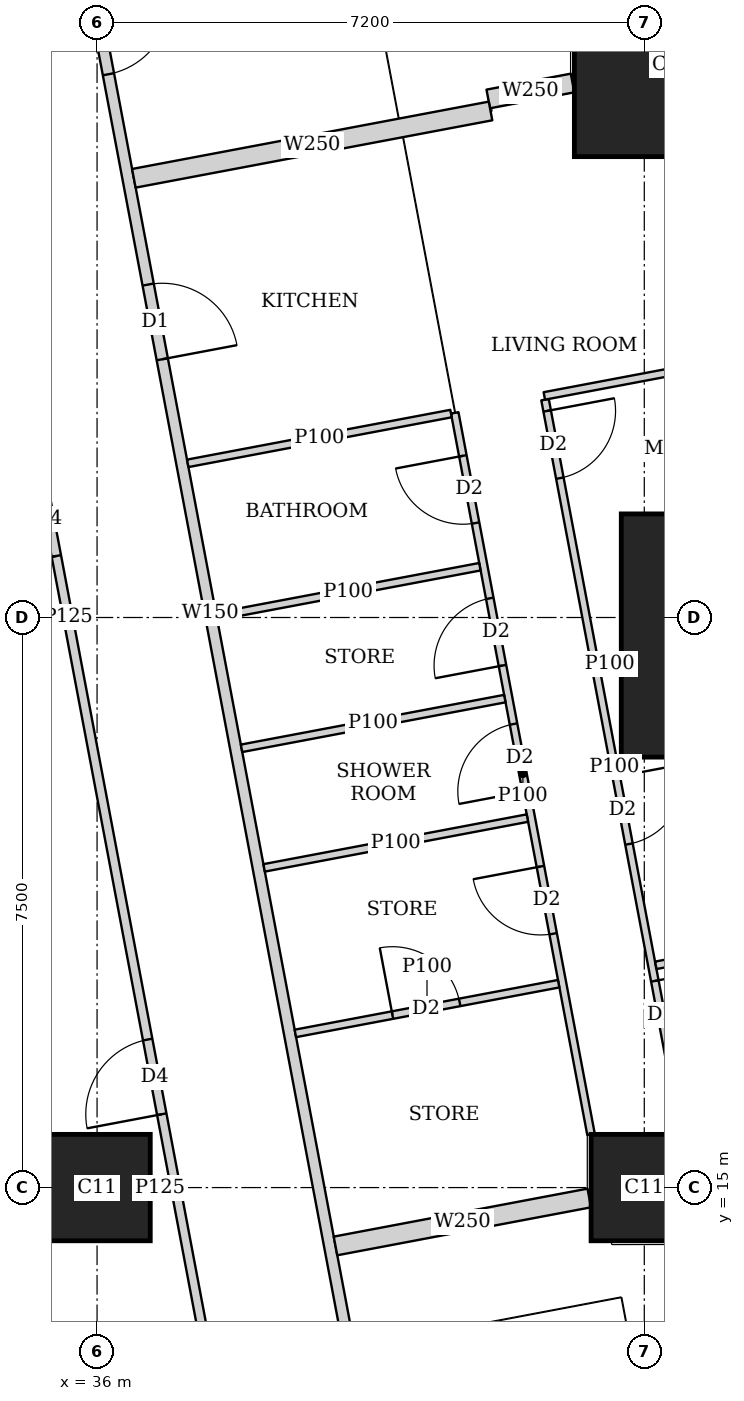
"""IFC4 building model, lengths in metres.
Left out: names, types, materials, properties, quantities, classifications, styles, units other than length and angle.
Written with IfcOpenShell. Run it as: python <this file> out.ifc"""

import sys

from ifc_helpers import new_model, si_unit, direction, frame, frame_2d, origin, origin_2d, place, context, subcontext, project, spatial, rectangle, extrude, element, fill, save


model = new_model("IFC4")
c1 = context("Model", 3, precision=1e-05, world=origin(), true_north=direction((0.0, 1.0)))
c2 = subcontext(c1, "Body", "Model", "MODEL_VIEW")
j1 = project(units=[si_unit("LENGTHUNIT", "METRE"), si_unit("PLANEANGLEUNIT", "RADIAN")], contexts=[c1])
p1 = place(None, origin())
s1 = spatial("IfcSite", under=j1, at=p1, CompositionType="ELEMENT")
p2 = place(p1, origin())
s2 = spatial("IfcBuilding", under=s1, at=p2, CompositionType="ELEMENT")
p3 = place(p2, frame((0.0, 0.0, 204.95)))
s3 = spatial("IfcBuildingStorey", under=s2, at=p3, CompositionType="ELEMENT", Elevation=204.95)
for number, where, z_axis, x_axis in (
    (1, (36.0, 15.0, 0.0), (0.0, 0.0, 1.0), (1.0, 0.0, 0.0)),
    (2, (43.2, 15.0, 0.0), (0.0, 0.0, 1.0), (1.0, 0.0, 0.0)),
):
    element("IfcColumn", number, at=place(p3, frame(where, z_axis=z_axis, x_axis=x_axis)), inside=s3, PredefinedType="COLUMN", context=c2, shape_type="SweptSolid", body=[
        extrude(rectangle(XDim=1.4, YDim=1.4, at=origin_2d()), origin(), (0.0, 0.0, 1.0), 3.75),
    ])
p4 = place(p3, frame((44.697, 22.263, 0.0), z_axis=(0.0, 0.0, 1.0), x_axis=(1.0, 0.0, 0.0)))
e3 = element("IfcColumn", 3, at=p4, inside=s3, PredefinedType="COLUMN", context=c2, shape_type="SweptSolid", body=[
    extrude(rectangle(XDim=3.6, YDim=3.2, at=origin_2d()), origin(), (0.0, 0.0, 1.0), 3.75),
])
p5 = place(p3, frame((43.48, 29.763, 0.0), z_axis=(0.0, 0.0, 1.0), x_axis=(1.0, 0.0, 0.0)))
e4 = element("IfcColumn", 4, at=p5, inside=s3, PredefinedType="COLUMN", context=c2, shape_type="SweptSolid", body=[
    extrude(rectangle(XDim=2.4, YDim=2.4, at=origin_2d()), origin(), (0.0, 0.0, 1.0), 3.75),
])
p6 = place(p3, frame((50.653, 2.703, 0.0), z_axis=(0.0, 0.0, 1.0), x_axis=(-0.185612026696, 0.982623109613, 0.0)))
e5 = element("IfcWall", 5, at=p6, inside=s3, PredefinedType="SOLIDWALL", context=c2, shape_type="SweptSolid", body=[
    extrude(rectangle(XDim=41.393, YDim=0.2, at=frame_2d((20.697, 0.0))), origin(), (0.0, 0.0, 1.0), 3.5),
])
p7 = place(p6, frame((1.633, 0.0, 0.9)))
e6 = element("IfcOpeningElement", 6, at=p7, cuts=e5, PredefinedType="OPENING", context=c2, shape_type="SweptSolid", body=[
    extrude(rectangle(XDim=1.8, YDim=1.5, at=frame_2d((0.9, 0.75))), frame((0.0, 0.11, 0.0), z_axis=(0.0, -1.0, 0.0), x_axis=(1.0, 0.0, 0.0)), (0.0, 0.0, 1.0), 0.22),
])
p8 = place(p6, frame((6.032, 0.0, 0.9)))
e7 = element("IfcOpeningElement", 7, at=p8, cuts=e5, PredefinedType="OPENING", context=c2, shape_type="SweptSolid", body=[
    extrude(rectangle(XDim=1.8, YDim=1.5, at=frame_2d((0.9, 0.75))), frame((0.0, 0.11, 0.0), z_axis=(0.0, -1.0, 0.0), x_axis=(1.0, 0.0, 0.0)), (0.0, 0.0, 1.0), 0.22),
])
p9 = place(p6, frame((9.848, 0.0, 0.9)))
e8 = element("IfcOpeningElement", 8, at=p9, cuts=e5, PredefinedType="OPENING", context=c2, shape_type="SweptSolid", body=[
    extrude(rectangle(XDim=1.8, YDim=1.5, at=frame_2d((0.9, 0.75))), frame((0.0, 0.11, 0.0), z_axis=(0.0, -1.0, 0.0), x_axis=(1.0, 0.0, 0.0)), (0.0, 0.0, 1.0), 0.22),
])
p10 = place(p6, frame((13.664, 0.0, 0.9)))
e9 = element("IfcOpeningElement", 9, at=p10, cuts=e5, PredefinedType="OPENING", context=c2, shape_type="SweptSolid", body=[
    extrude(rectangle(XDim=1.8, YDim=1.5, at=frame_2d((0.9, 0.75))), frame((0.0, 0.11, 0.0), z_axis=(0.0, -1.0, 0.0), x_axis=(1.0, 0.0, 0.0)), (0.0, 0.0, 1.0), 0.22),
])
p11 = place(p6, frame((17.481, 0.0, 0.9)))
e10 = element("IfcOpeningElement", 10, at=p11, cuts=e5, PredefinedType="OPENING", context=c2, shape_type="SweptSolid", body=[
    extrude(rectangle(XDim=1.8, YDim=1.5, at=frame_2d((0.9, 0.75))), frame((0.0, 0.11, 0.0), z_axis=(0.0, -1.0, 0.0), x_axis=(1.0, 0.0, 0.0)), (0.0, 0.0, 1.0), 0.22),
])
p12 = place(p6, frame((21.297, 0.0, 0.9)))
e11 = element("IfcOpeningElement", 11, at=p12, cuts=e5, PredefinedType="OPENING", context=c2, shape_type="SweptSolid", body=[
    extrude(rectangle(XDim=1.8, YDim=1.5, at=frame_2d((0.9, 0.75))), frame((0.0, 0.11, 0.0), z_axis=(0.0, -1.0, 0.0), x_axis=(1.0, 0.0, 0.0)), (0.0, 0.0, 1.0), 0.22),
])
p13 = place(p6, frame((25.113, 0.0, 0.9)))
e12 = element("IfcOpeningElement", 12, at=p13, cuts=e5, PredefinedType="OPENING", context=c2, shape_type="SweptSolid", body=[
    extrude(rectangle(XDim=1.8, YDim=1.5, at=frame_2d((0.9, 0.75))), frame((0.0, 0.11, 0.0), z_axis=(0.0, -1.0, 0.0), x_axis=(1.0, 0.0, 0.0)), (0.0, 0.0, 1.0), 0.22),
])
p14 = place(p6, frame((28.93, 0.0, 0.9)))
e13 = element("IfcOpeningElement", 13, at=p14, cuts=e5, PredefinedType="OPENING", context=c2, shape_type="SweptSolid", body=[
    extrude(rectangle(XDim=1.8, YDim=1.5, at=frame_2d((0.9, 0.75))), frame((0.0, 0.11, 0.0), z_axis=(0.0, -1.0, 0.0), x_axis=(1.0, 0.0, 0.0)), (0.0, 0.0, 1.0), 0.22),
])
p15 = place(p6, frame((32.746, 0.0, 0.9)))
e14 = element("IfcOpeningElement", 14, at=p15, cuts=e5, PredefinedType="OPENING", context=c2, shape_type="SweptSolid", body=[
    extrude(rectangle(XDim=1.8, YDim=1.5, at=frame_2d((0.9, 0.75))), frame((0.0, 0.11, 0.0), z_axis=(0.0, -1.0, 0.0), x_axis=(1.0, 0.0, 0.0)), (0.0, 0.0, 1.0), 0.22),
])
p16 = place(p6, frame((36.481, 0.0, 0.9)))
e15 = element("IfcOpeningElement", 15, at=p16, cuts=e5, PredefinedType="OPENING", context=c2, shape_type="SweptSolid", body=[
    extrude(rectangle(XDim=1.8, YDim=1.5, at=frame_2d((0.9, 0.75))), frame((0.0, 0.11, 0.0), z_axis=(0.0, -1.0, 0.0), x_axis=(1.0, 0.0, 0.0)), (0.0, 0.0, 1.0), 0.22),
])
p17 = place(p3, frame((33.68, 42.723, 0.0), z_axis=(0.0, 0.0, 1.0), x_axis=(0.185601160014, -0.982625162207, 0.0)))
e16 = element("IfcWall", 16, at=p17, inside=s3, PredefinedType="SOLIDWALL", context=c2, shape_type="SweptSolid", body=[
    extrude(rectangle(XDim=41.051, YDim=0.15, at=frame_2d((20.526, 0.0))), origin(), (0.0, 0.0, 1.0), 2.5),
])
p18 = place(p17, frame((12.307, 0.0, 0.0)))
e17 = element("IfcOpeningElement", 17, at=p18, cuts=e16, PredefinedType="OPENING", context=c2, shape_type="SweptSolid", body=[
    extrude(rectangle(XDim=1.0, YDim=2.1, at=frame_2d((0.5, 1.05))), frame((0.0, 0.085, 0.0), z_axis=(0.0, -1.0, 0.0), x_axis=(1.0, 0.0, 0.0)), (0.0, 0.0, 1.0), 0.17),
])
p19 = place(p17, frame((16.123, 0.0, 0.0)))
e18 = element("IfcOpeningElement", 18, at=p19, cuts=e16, PredefinedType="OPENING", context=c2, shape_type="SweptSolid", body=[
    extrude(rectangle(XDim=1.0, YDim=2.1, at=frame_2d((0.5, 1.05))), frame((0.0, 0.085, 0.0), z_axis=(0.0, -1.0, 0.0), x_axis=(1.0, 0.0, 0.0)), (0.0, 0.0, 1.0), 0.17),
])
p20 = place(p17, frame((30.902, 0.0, 0.0)))
e19 = element("IfcOpeningElement", 19, at=p20, cuts=e16, PredefinedType="OPENING", context=c2, shape_type="SweptSolid", body=[
    extrude(rectangle(XDim=1.0, YDim=2.1, at=frame_2d((0.5, 1.05))), frame((0.0, 0.085, 0.0), z_axis=(0.0, -1.0, 0.0), x_axis=(1.0, 0.0, 0.0)), (0.0, 0.0, 1.0), 0.17),
])
p21 = place(p3, frame((41.894, 25.366, 0.0), z_axis=(0.0, 0.0, 1.0), x_axis=(0.185612905165, -0.982622943675, 0.0)))
e20 = element("IfcWall", 20, at=p21, inside=s3, PredefinedType="PARTITIONING", context=c2, shape_type="SweptSolid", body=[
    extrude(rectangle(XDim=9.827, YDim=0.1, at=frame_2d((4.913, 0.0))), origin(), (0.0, 0.0, 1.0), 2.5),
])
p22 = place(p21, frame((0.151, 0.0, 0.0)))
e21 = element("IfcOpeningElement", 21, at=p22, cuts=e20, PredefinedType="OPENING", context=c2, shape_type="SweptSolid", body=[
    extrude(rectangle(XDim=0.9, YDim=2.1, at=frame_2d((0.45, 1.05))), frame((0.0, 0.06, 0.0), z_axis=(0.0, -1.0, 0.0), x_axis=(1.0, 0.0, 0.0)), (0.0, 0.0, 1.0), 0.12),
])
p23 = place(p21, frame((5.05, 0.0, 0.0)))
e22 = element("IfcOpeningElement", 22, at=p23, cuts=e20, PredefinedType="OPENING", context=c2, shape_type="SweptSolid", body=[
    extrude(rectangle(XDim=0.9, YDim=2.1, at=frame_2d((0.45, 1.05))), frame((0.0, 0.06, 0.0), z_axis=(0.0, -1.0, 0.0), x_axis=(1.0, 0.0, 0.0)), (0.0, 0.0, 1.0), 0.12),
])
p24 = place(p21, frame((7.783, 0.0, 0.0)))
e23 = element("IfcOpeningElement", 23, at=p24, cuts=e20, PredefinedType="OPENING", context=c2, shape_type="SweptSolid", body=[
    extrude(rectangle(XDim=0.9, YDim=2.1, at=frame_2d((0.45, 1.05))), frame((0.0, 0.06, 0.0), z_axis=(0.0, -1.0, 0.0), x_axis=(1.0, 0.0, 0.0)), (0.0, 0.0, 1.0), 0.12),
])
p25 = place(p3, frame((40.706, 25.192, 0.0), z_axis=(0.0, 0.0, 1.0), x_axis=(0.185629824463, -0.982619747547, 0.0)))
e24 = element("IfcWall", 24, at=p25, inside=s3, PredefinedType="PARTITIONING", context=c2, shape_type="SweptSolid", body=[
    extrude(rectangle(XDim=9.659, YDim=0.1, at=frame_2d((4.83, 0.0))), origin(), (0.0, 0.0, 1.0), 2.5),
])
p26 = place(p25, frame((0.575, 0.0, 0.0)))
e25 = element("IfcOpeningElement", 25, at=p26, cuts=e24, PredefinedType="OPENING", context=c2, shape_type="SweptSolid", body=[
    extrude(rectangle(XDim=0.9, YDim=2.1, at=frame_2d((0.45, 1.05))), frame((0.0, 0.06, 0.0), z_axis=(0.0, -1.0, 0.0), x_axis=(1.0, 0.0, 0.0)), (0.0, 0.0, 1.0), 0.12),
])
p27 = place(p25, frame((4.166, 0.0, 0.0)))
e26 = element("IfcOpeningElement", 26, at=p27, cuts=e24, PredefinedType="OPENING", context=c2, shape_type="SweptSolid", body=[
    extrude(rectangle(XDim=0.9, YDim=2.1, at=frame_2d((0.45, 1.05))), frame((0.0, 0.06, 0.0), z_axis=(0.0, -1.0, 0.0), x_axis=(1.0, 0.0, 0.0)), (0.0, 0.0, 1.0), 0.12),
])
p28 = place(p25, frame((2.483, 0.0, 0.0)))
e27 = element("IfcOpeningElement", 27, at=p28, cuts=e24, PredefinedType="OPENING", context=c2, shape_type="SweptSolid", body=[
    extrude(rectangle(XDim=0.9, YDim=2.1, at=frame_2d((0.45, 1.05))), frame((0.0, 0.06, 0.0), z_axis=(0.0, -1.0, 0.0), x_axis=(1.0, 0.0, 0.0)), (0.0, 0.0, 1.0), 0.12),
])
p29 = place(p25, frame((6.074, 0.0, 0.0)))
e28 = element("IfcOpeningElement", 28, at=p29, cuts=e24, PredefinedType="OPENING", context=c2, shape_type="SweptSolid", body=[
    extrude(rectangle(XDim=0.9, YDim=2.1, at=frame_2d((0.45, 1.05))), frame((0.0, 0.06, 0.0), z_axis=(0.0, -1.0, 0.0), x_axis=(1.0, 0.0, 0.0)), (0.0, 0.0, 1.0), 0.12),
])
p30 = place(p3, frame((46.11, 26.213, 0.0), z_axis=(0.0, 0.0, 1.0), x_axis=(-0.982633535512, -0.185556823879, 0.0)))
e29 = element("IfcWall", 29, at=p30, inside=s3, PredefinedType="PARTITIONING", context=c2, shape_type="SweptSolid", body=[
    extrude(rectangle(XDim=4.3, YDim=0.1, at=frame_2d((2.15, 0.0))), origin(), (0.0, 0.0, 1.0), 2.05),
])
p31 = place(p3, frame((42.887, 21.921, 0.0), z_axis=(0.0, 0.0, 1.0), x_axis=(-0.982688058078, -0.185267861514, 0.0)))
e30 = element("IfcWall", 30, at=p31, inside=s3, PredefinedType="PARTITIONING", context=c2, shape_type="SweptSolid", body=[
    extrude(rectangle(XDim=0.286, YDim=0.1, at=frame_2d((0.143, 0.0))), origin(), (0.0, 0.0, 1.0), 2.5),
])
p32 = place(p3, frame((47.527, 18.712, 0.0), z_axis=(0.0, 0.0, 1.0), x_axis=(-0.982665405803, -0.185387972203, 0.0)))
e31 = element("IfcWall", 31, at=p32, inside=s3, PredefinedType="PARTITIONING", context=c2, shape_type="SweptSolid", body=[
    extrude(rectangle(XDim=4.25, YDim=0.1, at=frame_2d((2.125, 0.0))), origin(), (0.0, 0.0, 1.0), 2.05),
])
p33 = place(p3, frame((40.657, 25.183, 0.0), z_axis=(0.0, 0.0, 1.0), x_axis=(-0.982585626838, -0.185810349366, 0.0)))
e32 = element("IfcWall", 32, at=p33, inside=s3, PredefinedType="PARTITIONING", context=c2, shape_type="SweptSolid", body=[
    extrude(rectangle(XDim=3.525, YDim=0.1, at=frame_2d((1.763, 0.0))), origin(), (0.0, 0.0, 1.0), 3.5),
])
p34 = place(p3, frame((41.365, 21.433, 0.0), z_axis=(0.0, 0.0, 1.0), x_axis=(-0.982638553676, -0.185530247748, 0.0)))
e33 = element("IfcWall", 33, at=p34, inside=s3, PredefinedType="PARTITIONING", context=c2, shape_type="SweptSolid", body=[
    extrude(rectangle(XDim=3.525, YDim=0.1, at=frame_2d((1.763, 0.0))), origin(), (0.0, 0.0, 1.0), 3.5),
])
p35 = place(p3, frame((42.073, 17.682, 0.0), z_axis=(0.0, 0.0, 1.0), x_axis=(-0.98265117712, -0.185463376723, 0.0)))
e34 = element("IfcWall", 34, at=p35, inside=s3, PredefinedType="PARTITIONING", context=c2, shape_type="SweptSolid", body=[
    extrude(rectangle(XDim=3.525, YDim=0.1, at=frame_2d((1.763, 0.0))), origin(), (0.0, 0.0, 1.0), 3.5),
])
p36 = place(p35, frame((1.325, 0.0, 0.0)))
e35 = element("IfcOpeningElement", 35, at=p36, cuts=e34, PredefinedType="OPENING", context=c2, shape_type="SweptSolid", body=[
    extrude(rectangle(XDim=0.9, YDim=2.1, at=frame_2d((0.45, 1.05))), frame((0.0, 0.06, 0.0), z_axis=(0.0, -1.0, 0.0), x_axis=(1.0, 0.0, 0.0)), (0.0, 0.0, 1.0), 0.12),
])
p37 = place(p3, frame((41.037, 23.168, 0.0), z_axis=(0.0, 0.0, 1.0), x_axis=(-0.982638553676, -0.185530247748, 0.0)))
e36 = element("IfcWall", 36, at=p37, inside=s3, PredefinedType="PARTITIONING", context=c2, shape_type="SweptSolid", body=[
    extrude(rectangle(XDim=3.525, YDim=0.1, at=frame_2d((1.763, 0.0))), origin(), (0.0, 0.0, 1.0), 2.5),
])
p38 = place(p3, frame((41.662, 19.861, 0.0), z_axis=(0.0, 0.0, 1.0), x_axis=(-0.982588017646, -0.185797706064, 0.0)))
e37 = element("IfcWall", 37, at=p38, inside=s3, PredefinedType="PARTITIONING", context=c2, shape_type="SweptSolid", body=[
    extrude(rectangle(XDim=3.525, YDim=0.1, at=frame_2d((1.763, 0.0))), origin(), (0.0, 0.0, 1.0), 3.5),
])
p39 = place(p3, frame((42.256, 29.532, 0.0), z_axis=(0.0, 0.0, 1.0), x_axis=(-0.982549954272, -0.185998890749, 0.0)))
e38 = element("IfcWall", 38, at=p39, inside=s3, PredefinedType="SOLIDWALL", context=c2, shape_type="SweptSolid", body=[
    extrude(rectangle(XDim=1.129, YDim=0.25, at=frame_2d((0.564, 0.0))), origin(), (0.0, 0.0, 1.0), 2.05),
])
p40 = place(p3, frame((41.177, 29.164, 0.0), z_axis=(0.0, 0.0, 1.0), x_axis=(-0.982642846239, -0.185507511263, 0.0)))
e39 = element("IfcWall", 39, at=p40, inside=s3, PredefinedType="SOLIDWALL", context=c2, shape_type="SweptSolid", body=[
    extrude(rectangle(XDim=4.776, YDim=0.25, at=frame_2d((2.388, 0.0))), origin(), (0.0, 0.0, 1.0), 2.5),
])
p41 = place(p3, frame((42.476, 14.863, 0.0), z_axis=(0.0, 0.0, 1.0), x_axis=(-0.982603567712, -0.185715450942, 0.0)))
e40 = element("IfcWall", 40, at=p41, inside=s3, PredefinedType="SOLIDWALL", context=c2, shape_type="SweptSolid", body=[
    extrude(rectangle(XDim=3.398, YDim=0.25, at=frame_2d((1.699, 0.0))), origin(), (0.0, 0.0, 1.0), 3.5),
])
p42 = place(p3, frame((37.9, 10.413, 0.0), z_axis=(0.0, 0.0, 1.0), x_axis=(-0.185589740669, 0.982627319058, 0.0)))
e41 = element("IfcWall", 41, at=p42, inside=s3, PredefinedType="PARTITIONING", context=c2, shape_type="SweptSolid", body=[
    extrude(rectangle(XDim=24.602, YDim=0.125, at=frame_2d((12.301, 0.0))), origin(), (0.0, 0.0, 1.0), 2.5),
])
p43 = place(p42, frame((0.708, 0.0, 0.0)))
e42 = element("IfcOpeningElement", 42, at=p43, cuts=e41, PredefinedType="OPENING", context=c2, shape_type="SweptSolid", body=[
    extrude(rectangle(XDim=1.0, YDim=2.1, at=frame_2d((0.5, 1.05))), frame((0.0, 0.073, 0.0), z_axis=(0.0, -1.0, 0.0), x_axis=(1.0, 0.0, 0.0)), (0.0, 0.0, 1.0), 0.145),
])
p44 = place(p42, frame((5.65, 0.0, 0.0)))
e43 = element("IfcOpeningElement", 43, at=p44, cuts=e41, PredefinedType="OPENING", context=c2, shape_type="SweptSolid", body=[
    extrude(rectangle(XDim=1.0, YDim=2.1, at=frame_2d((0.5, 1.05))), frame((0.0, 0.073, 0.0), z_axis=(0.0, -1.0, 0.0), x_axis=(1.0, 0.0, 0.0)), (0.0, 0.0, 1.0), 0.145),
])
p45 = place(p42, frame((13.124, 0.0, 0.0)))
e44 = element("IfcOpeningElement", 44, at=p45, cuts=e41, PredefinedType="OPENING", context=c2, shape_type="SweptSolid", body=[
    extrude(rectangle(XDim=1.0, YDim=2.1, at=frame_2d((0.5, 1.05))), frame((0.0, 0.073, 0.0), z_axis=(0.0, -1.0, 0.0), x_axis=(1.0, 0.0, 0.0)), (0.0, 0.0, 1.0), 0.145),
])
p46 = place(p42, frame((16.94, 0.0, 0.0)))
e45 = element("IfcOpeningElement", 45, at=p46, cuts=e41, PredefinedType="OPENING", context=c2, shape_type="SweptSolid", body=[
    extrude(rectangle(XDim=1.0, YDim=2.1, at=frame_2d((0.5, 1.05))), frame((0.0, 0.073, 0.0), z_axis=(0.0, -1.0, 0.0), x_axis=(1.0, 0.0, 0.0)), (0.0, 0.0, 1.0), 0.145),
])
p47 = place(p42, frame((20.9, 0.0, 0.0)))
e46 = element("IfcOpeningElement", 46, at=p47, cuts=e41, PredefinedType="OPENING", context=c2, shape_type="SweptSolid", body=[
    extrude(rectangle(XDim=1.0, YDim=2.1, at=frame_2d((0.5, 1.05))), frame((0.0, 0.073, 0.0), z_axis=(0.0, -1.0, 0.0), x_axis=(1.0, 0.0, 0.0)), (0.0, 0.0, 1.0), 0.145),
])
p48 = place(p3, frame((36.701, 15.0, 0.0), z_axis=(0.0, 0.0, 1.0), x_axis=(1.0, 0.0, 0.0)))
e47 = element("IfcWall", 47, at=p48, inside=s3, PredefinedType="PARTITIONING", context=c2, shape_type="SweptSolid", body=[
    extrude(rectangle(XDim=0.257, YDim=0.125, at=frame_2d((0.128, 0.0))), origin(), (0.0, 0.0, 1.0), 3.5),
])
p49 = place(p3, frame((33.701, 22.5, 0.0), z_axis=(0.0, 0.0, 1.0), x_axis=(1.0, 0.0, 0.0)))
e48 = element("IfcWall", 48, at=p49, inside=s3, PredefinedType="PARTITIONING", context=c2, shape_type="SweptSolid", body=[
    extrude(rectangle(XDim=1.841, YDim=0.125, at=frame_2d((0.92, 0.0))), origin(), (0.0, 0.0, 1.0), 2.5),
])
p50 = place(p18, origin())
e49 = element("IfcDoor", 49, at=p50, inside=s3, OperationType="SINGLE_SWING_LEFT", PredefinedType="DOOR", context=c2, shape_type="SweptSolid", body=[
    extrude(rectangle(XDim=1.0, YDim=2.1, at=frame_2d((0.5, 1.05))), frame((0.0, 0.025, 0.0), z_axis=(0.0, -1.0, 0.0), x_axis=(1.0, 0.0, 0.0)), (0.0, 0.0, 1.0), 0.05),
])
fill(e17, e49)
p51 = place(p22, origin())
e50 = element("IfcDoor", 50, at=p51, inside=s3, OperationType="SINGLE_SWING_LEFT", PredefinedType="DOOR", context=c2, shape_type="SweptSolid", body=[
    extrude(rectangle(XDim=0.9, YDim=2.1, at=frame_2d((0.45, 1.05))), frame((0.0, 0.025, 0.0), z_axis=(0.0, -1.0, 0.0), x_axis=(1.0, 0.0, 0.0)), (0.0, 0.0, 1.0), 0.05),
])
fill(e21, e50)
p52 = place(p23, origin())
e51 = element("IfcDoor", 51, at=p52, inside=s3, OperationType="SINGLE_SWING_LEFT", PredefinedType="DOOR", context=c2, shape_type="SweptSolid", body=[
    extrude(rectangle(XDim=0.9, YDim=2.1, at=frame_2d((0.45, 1.05))), frame((0.0, 0.025, 0.0), z_axis=(0.0, -1.0, 0.0), x_axis=(1.0, 0.0, 0.0)), (0.0, 0.0, 1.0), 0.05),
])
fill(e22, e51)
p53 = place(p24, origin())
e52 = element("IfcDoor", 52, at=p53, inside=s3, OperationType="SINGLE_SWING_LEFT", PredefinedType="DOOR", context=c2, shape_type="SweptSolid", body=[
    extrude(rectangle(XDim=0.9, YDim=2.1, at=frame_2d((0.45, 1.05))), frame((0.0, 0.025, 0.0), z_axis=(0.0, -1.0, 0.0), x_axis=(1.0, 0.0, 0.0)), (0.0, 0.0, 1.0), 0.05),
])
fill(e23, e52)
p54 = place(p26, origin())
e53 = element("IfcDoor", 53, at=p54, inside=s3, OperationType="SINGLE_SWING_RIGHT", PredefinedType="DOOR", context=c2, shape_type="SweptSolid", body=[
    extrude(rectangle(XDim=0.9, YDim=2.1, at=frame_2d((0.45, 1.05))), frame((0.0, 0.025, 0.0), z_axis=(0.0, -1.0, 0.0), x_axis=(1.0, 0.0, 0.0)), (0.0, 0.0, 1.0), 0.05),
])
fill(e25, e53)
p55 = place(p27, origin())
e54 = element("IfcDoor", 54, at=p55, inside=s3, OperationType="SINGLE_SWING_LEFT", PredefinedType="DOOR", context=c2, shape_type="SweptSolid", body=[
    extrude(rectangle(XDim=0.9, YDim=2.1, at=frame_2d((0.45, 1.05))), frame((0.0, 0.025, 0.0), z_axis=(0.0, -1.0, 0.0), x_axis=(1.0, 0.0, 0.0)), (0.0, 0.0, 1.0), 0.05),
])
fill(e26, e54)
p56 = place(p28, origin())
e55 = element("IfcDoor", 55, at=p56, inside=s3, OperationType="SINGLE_SWING_LEFT", PredefinedType="DOOR", context=c2, shape_type="SweptSolid", body=[
    extrude(rectangle(XDim=0.9, YDim=2.1, at=frame_2d((0.45, 1.05))), frame((0.0, 0.025, 0.0), z_axis=(0.0, -1.0, 0.0), x_axis=(1.0, 0.0, 0.0)), (0.0, 0.0, 1.0), 0.05),
])
fill(e27, e55)
p57 = place(p29, origin())
e56 = element("IfcDoor", 56, at=p57, inside=s3, OperationType="SINGLE_SWING_RIGHT", PredefinedType="DOOR", context=c2, shape_type="SweptSolid", body=[
    extrude(rectangle(XDim=0.9, YDim=2.1, at=frame_2d((0.45, 1.05))), frame((0.0, 0.025, 0.0), z_axis=(0.0, -1.0, 0.0), x_axis=(1.0, 0.0, 0.0)), (0.0, 0.0, 1.0), 0.05),
])
fill(e28, e56)
p58 = place(p19, origin())
e57 = element("IfcDoor", 57, at=p58, inside=s3, OperationType="SINGLE_SWING_RIGHT", PredefinedType="DOOR", context=c2, shape_type="SweptSolid", body=[
    extrude(rectangle(XDim=1.0, YDim=2.1, at=frame_2d((0.5, 1.05))), frame((0.0, 0.025, 0.0), z_axis=(0.0, -1.0, 0.0), x_axis=(1.0, 0.0, 0.0)), (0.0, 0.0, 1.0), 0.05),
])
fill(e18, e57)
p59 = place(p36, origin())
e58 = element("IfcDoor", 58, at=p59, inside=s3, OperationType="SINGLE_SWING_LEFT", PredefinedType="DOOR", context=c2, shape_type="SweptSolid", body=[
    extrude(rectangle(XDim=0.9, YDim=2.1, at=frame_2d((0.45, 1.05))), frame((0.0, 0.025, 0.0), z_axis=(0.0, -1.0, 0.0), x_axis=(1.0, 0.0, 0.0)), (0.0, 0.0, 1.0), 0.05),
])
fill(e35, e58)
p60 = place(p44, origin())
e59 = element("IfcDoor", 59, at=p60, inside=s3, OperationType="SINGLE_SWING_LEFT", PredefinedType="DOOR", context=c2, shape_type="SweptSolid", body=[
    extrude(rectangle(XDim=1.0, YDim=2.1, at=frame_2d((0.5, 1.05))), frame((0.0, 0.025, 0.0), z_axis=(0.0, -1.0, 0.0), x_axis=(1.0, 0.0, 0.0)), (0.0, 0.0, 1.0), 0.05),
])
fill(e43, e59)
p61 = place(p45, origin())
e60 = element("IfcDoor", 60, at=p61, inside=s3, OperationType="SINGLE_SWING_LEFT", PredefinedType="DOOR", context=c2, shape_type="SweptSolid", body=[
    extrude(rectangle(XDim=1.0, YDim=2.1, at=frame_2d((0.5, 1.05))), frame((0.0, 0.025, 0.0), z_axis=(0.0, -1.0, 0.0), x_axis=(1.0, 0.0, 0.0)), (0.0, 0.0, 1.0), 0.05),
])
fill(e44, e60)
save(model, sys.argv[1])
